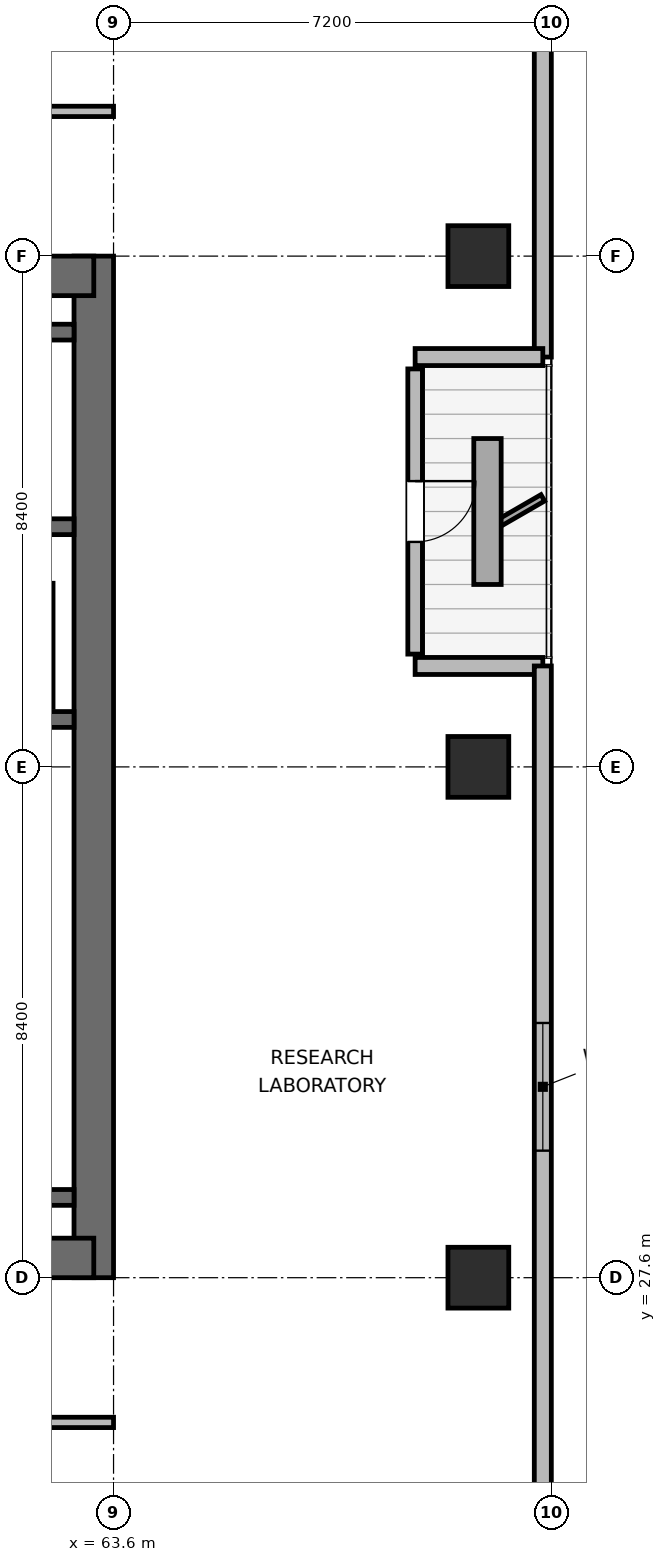
"""IFC4 building model, lengths in metres.
Left out: names, types, materials, properties, quantities, classifications, styles, units other than length and angle.
Written with IfcOpenShell. Run it as: python <this file> out.ifc"""

import sys

from ifc_helpers import new_model, si_unit, direction, frame, frame_2d, origin, origin_2d, place, context, subcontext, project, spatial, rectangle, extrude, element, fill, save


model = new_model("IFC4")
c1 = context("Model", 3, precision=1e-05, world=origin(), true_north=direction((0.0, 1.0)))
c2 = subcontext(c1, "Body", "Model", "MODEL_VIEW")
j1 = project(units=[si_unit("LENGTHUNIT", "METRE"), si_unit("PLANEANGLEUNIT", "RADIAN")], contexts=[c1])
p1 = place(None, origin())
s1 = spatial("IfcSite", under=j1, at=p1, CompositionType="ELEMENT")
p2 = place(p1, origin())
s2 = spatial("IfcBuilding", under=s1, at=p2, CompositionType="ELEMENT")
p3 = place(p2, frame((0.0, 0.0, 247.2)))
s3 = spatial("IfcBuildingStorey", under=s2, at=p3, CompositionType="ELEMENT", Elevation=247.2)
p4 = place(p3, frame((63.275, 27.6, 0.0), z_axis=(0.0, 0.0, 1.0), x_axis=(0.0, 1.0, 0.0)))
e1 = element("IfcWall", 1, at=p4, inside=s3, PredefinedType="SHEAR", context=c2, shape_type="SweptSolid", body=[
    extrude(rectangle(XDim=16.8, YDim=0.65, at=frame_2d((8.4, 0.0))), origin(), (0.0, 0.0, 1.0), 3.9),
])
p5 = place(p3, frame((53.925, 27.925, 0.0), z_axis=(0.0, 0.0, 1.0), x_axis=(1.0, 0.0, 0.0)))
e2 = element("IfcWall", 2, at=p5, inside=s3, PredefinedType="SHEAR", context=c2, shape_type="SweptSolid", body=[
    extrude(rectangle(XDim=9.35, YDim=0.65, at=frame_2d((4.675, 0.0))), origin(), (0.0, 0.0, 1.0), 3.9),
])
p6 = place(p5, frame((3.975, 0.0, 0.0)))
e3 = element("IfcOpeningElement", 3, at=p6, cuts=e2, PredefinedType="OPENING", context=c2, shape_type="SweptSolid", body=[
    extrude(rectangle(XDim=1.05, YDim=2.04, at=frame_2d((0.525, 1.02))), frame((0.0, 0.335, 0.0), z_axis=(0.0, -1.0, 0.0), x_axis=(1.0, 0.0, 0.0)), (0.0, 0.0, 1.0), 0.67),
])
p7 = place(p3, frame((53.925, 44.075, 0.0), z_axis=(0.0, 0.0, 1.0), x_axis=(1.0, 0.0, 0.0)))
e4 = element("IfcWall", 4, at=p7, inside=s3, PredefinedType="SHEAR", context=c2, shape_type="SweptSolid", body=[
    extrude(rectangle(XDim=9.35, YDim=0.65, at=frame_2d((4.675, 0.0))), origin(), (0.0, 0.0, 1.0), 3.9),
])
for number, where, z_axis, x_axis in (
    (5, (58.89, 28.92, 0.0), (0.0, 0.0, 1.0), (1.0, 0.0, 0.0)),
    (6, (58.89, 36.78, 0.0), (0.0, 0.0, 1.0), (1.0, 0.0, 0.0)),
):
    element("IfcWall", number, at=place(p3, frame(where, z_axis=z_axis, x_axis=x_axis)), inside=s3, PredefinedType="SHEAR", context=c2, shape_type="SweptSolid", body=[
        extrude(rectangle(XDim=4.06, YDim=0.26, at=frame_2d((2.03, 0.0))), origin(), (0.0, 0.0, 1.0), 3.9),
    ])
p8 = place(p3, frame((54.25, 39.95, 0.0), z_axis=(0.0, 0.0, 1.0), x_axis=(1.0, 0.0, 0.0)))
e7 = element("IfcWall", 7, at=p8, inside=s3, PredefinedType="SHEAR", context=c2, shape_type="SweptSolid", body=[
    extrude(rectangle(XDim=8.7, YDim=0.26, at=frame_2d((4.35, 0.0))), origin(), (0.0, 0.0, 1.0), 3.9),
])
p9 = place(p8, frame((0.95, 0.0, 0.0)))
e8 = element("IfcOpeningElement", 8, at=p9, cuts=e7, PredefinedType="OPENING", context=c2, shape_type="SweptSolid", body=[
    extrude(rectangle(XDim=1.0, YDim=2.04, at=frame_2d((0.5, 1.02))), frame((0.0, 0.14, 0.0), z_axis=(0.0, -1.0, 0.0), x_axis=(1.0, 0.0, 0.0)), (0.0, 0.0, 1.0), 0.28),
])
p10 = place(p3, frame((54.25, 43.15, 0.0), z_axis=(0.0, 0.0, 1.0), x_axis=(1.0, 0.0, 0.0)))
e9 = element("IfcWall", 9, at=p10, inside=s3, PredefinedType="SHEAR", context=c2, shape_type="SweptSolid", body=[
    extrude(rectangle(XDim=8.7, YDim=0.26, at=frame_2d((4.35, 0.0))), origin(), (0.0, 0.0, 1.0), 3.9),
])
for number, where, z_axis, x_axis in (
    (10, (69.6, 27.6, 0.0), (0.0, 0.0, 1.0), (1.0, 0.0, 0.0)),
    (11, (69.6, 36.0, 0.0), (0.0, 0.0, 1.0), (1.0, 0.0, 0.0)),
    (12, (69.6, 44.4, 0.0), (0.0, 0.0, 1.0), (1.0, 0.0, 0.0)),
):
    element("IfcColumn", number, at=place(p3, frame(where, z_axis=z_axis, x_axis=x_axis)), inside=s3, PredefinedType="COLUMN", context=c2, shape_type="SweptSolid", body=[
        extrude(rectangle(XDim=1.0, YDim=1.0, at=origin_2d()), origin(), (0.0, 0.0, 1.0), 3.9),
    ])
p11 = place(p3, frame((70.66, 57.182, 0.0), z_axis=(0.0, 0.0, 1.0), x_axis=(0.0, -1.0, 0.0)))
e13 = element("IfcWall", 13, at=p11, inside=s3, PredefinedType="SOLIDWALL", context=c2, shape_type="SweptSolid", body=[
    extrude(rectangle(XDim=14.442, YDim=0.28, at=frame_2d((7.221, 0.0))), origin(), (0.0, 0.0, 1.0), 3.68),
])
p12 = place(p3, frame((70.66, 42.74, 0.0), z_axis=(0.0, 0.0, 1.0), x_axis=(-1.0, 0.0, 0.0)))
e14 = element("IfcWall", 14, at=p12, inside=s3, PredefinedType="SOLIDWALL", context=c2, shape_type="SweptSolid", body=[
    extrude(rectangle(XDim=2.1, YDim=0.28, at=frame_2d((1.05, 0.0))), origin(), (0.0, 0.0, 1.0), 3.116),
])
p13 = place(p3, frame((68.56, 42.545, 0.0), z_axis=(0.0, 0.0, 1.0), x_axis=(0.0, -1.0, 0.0)))
e15 = element("IfcWall", 15, at=p13, inside=s3, PredefinedType="SOLIDWALL", context=c2, shape_type="SweptSolid", body=[
    extrude(rectangle(XDim=4.69, YDim=0.24, at=frame_2d((2.345, 0.0))), origin(), (0.0, 0.0, 1.0), 3.248),
])
p14 = place(p13, frame((1.845, 0.0, 0.0)))
e16 = element("IfcOpeningElement", 16, at=p14, cuts=e15, PredefinedType="OPENING", context=c2, shape_type="SweptSolid", body=[
    extrude(rectangle(XDim=1.0, YDim=2.02, at=frame_2d((0.5, 1.01))), frame((0.0, 0.13, 0.0), z_axis=(0.0, -1.0, 0.0), x_axis=(1.0, 0.0, 0.0)), (0.0, 0.0, 1.0), 0.26),
])
p15 = place(p3, frame((68.56, 37.66, 0.0), z_axis=(0.0, 0.0, 1.0), x_axis=(1.0, 0.0, 0.0)))
e17 = element("IfcWall", 17, at=p15, inside=s3, PredefinedType="SOLIDWALL", context=c2, shape_type="SweptSolid", body=[
    extrude(rectangle(XDim=2.1, YDim=0.28, at=frame_2d((1.05, 0.0))), origin(), (0.0, 0.0, 1.0), 3.116),
])
p16 = place(p3, frame((70.66, 37.66, 0.0), z_axis=(0.0, 0.0, 1.0), x_axis=(0.0, -1.0, 0.0)))
e18 = element("IfcWall", 18, at=p16, inside=s3, PredefinedType="SOLIDWALL", context=c2, shape_type="SweptSolid", body=[
    extrude(rectangle(XDim=13.842, YDim=0.28, at=frame_2d((6.921, 0.0))), origin(), (0.0, 0.0, 1.0), 3.68),
])
p17 = place(p16, frame((5.871, 0.0, 0.85)))
e19 = element("IfcOpeningElement", 19, at=p17, cuts=e18, PredefinedType="OPENING", context=c2, shape_type="SweptSolid", body=[
    extrude(rectangle(XDim=2.1, YDim=1.05, at=frame_2d((1.05, 0.525))), frame((0.0, 0.15, 0.0), z_axis=(0.0, -1.0, 0.0), x_axis=(1.0, 0.0, 0.0)), (0.0, 0.0, 1.0), 0.3),
])
p18 = place(p3, frame((62.5, 36.98, 0.0), z_axis=(0.0, 0.0, 1.0), x_axis=(0.0, 1.0, 0.0)))
e20 = element("IfcWall", 20, at=p18, inside=s3, PredefinedType="PARTITIONING", context=c2, shape_type="SweptSolid", body=[
    extrude(rectangle(XDim=2.04, YDim=0.21, at=frame_2d((1.02, 0.0))), origin(), (0.0, 0.0, 1.0), 3.68),
])
p19 = place(p3, frame((30.075, 25.22, 0.0), z_axis=(0.0, 0.0, 1.0), x_axis=(1.0, 0.0, 0.0)))
e21 = element("IfcWall", 21, at=p19, inside=s3, PredefinedType="PARTITIONING", context=c2, shape_type="SweptSolid", body=[
    extrude(rectangle(XDim=33.525, YDim=0.17, at=frame_2d((16.763, 0.0))), origin(), (0.0, 0.0, 1.0), 3.68),
])
p20 = place(p19, frame((2.717, 0.0, 0.0)))
e22 = element("IfcOpeningElement", 22, at=p20, cuts=e21, PredefinedType="OPENING", context=c2, shape_type="SweptSolid", body=[
    extrude(rectangle(XDim=0.95, YDim=2.04, at=frame_2d((0.475, 1.02))), frame((0.0, 0.095, 0.0), z_axis=(0.0, -1.0, 0.0), x_axis=(1.0, 0.0, 0.0)), (0.0, 0.0, 1.0), 0.19),
])
p21 = place(p19, frame((8.505, 0.0, 0.0)))
e23 = element("IfcOpeningElement", 23, at=p21, cuts=e21, PredefinedType="OPENING", context=c2, shape_type="SweptSolid", body=[
    extrude(rectangle(XDim=0.95, YDim=2.04, at=frame_2d((0.475, 1.02))), frame((0.0, 0.095, 0.0), z_axis=(0.0, -1.0, 0.0), x_axis=(1.0, 0.0, 0.0)), (0.0, 0.0, 1.0), 0.19),
])
p22 = place(p19, frame((13.695, 0.0, 0.0)))
e24 = element("IfcOpeningElement", 24, at=p22, cuts=e21, PredefinedType="OPENING", context=c2, shape_type="SweptSolid", body=[
    extrude(rectangle(XDim=0.95, YDim=2.04, at=frame_2d((0.475, 1.02))), frame((0.0, 0.095, 0.0), z_axis=(0.0, -1.0, 0.0), x_axis=(1.0, 0.0, 0.0)), (0.0, 0.0, 1.0), 0.19),
])
p23 = place(p19, frame((18.88, 0.0, 0.0)))
e25 = element("IfcOpeningElement", 25, at=p23, cuts=e21, PredefinedType="OPENING", context=c2, shape_type="SweptSolid", body=[
    extrude(rectangle(XDim=0.95, YDim=2.04, at=frame_2d((0.475, 1.02))), frame((0.0, 0.095, 0.0), z_axis=(0.0, -1.0, 0.0), x_axis=(1.0, 0.0, 0.0)), (0.0, 0.0, 1.0), 0.19),
])
p24 = place(p19, frame((24.065, 0.0, 0.0)))
e26 = element("IfcOpeningElement", 26, at=p24, cuts=e21, PredefinedType="OPENING", context=c2, shape_type="SweptSolid", body=[
    extrude(rectangle(XDim=0.95, YDim=2.04, at=frame_2d((0.475, 1.02))), frame((0.0, 0.095, 0.0), z_axis=(0.0, -1.0, 0.0), x_axis=(1.0, 0.0, 0.0)), (0.0, 0.0, 1.0), 0.19),
])
p25 = place(p19, frame((29.855, 0.0, 0.0)))
e27 = element("IfcOpeningElement", 27, at=p25, cuts=e21, PredefinedType="OPENING", context=c2, shape_type="SweptSolid", body=[
    extrude(rectangle(XDim=0.95, YDim=2.04, at=frame_2d((0.475, 1.02))), frame((0.0, 0.095, 0.0), z_axis=(0.0, -1.0, 0.0), x_axis=(1.0, 0.0, 0.0)), (0.0, 0.0, 1.0), 0.19),
])
p26 = place(p3, frame((30.075, 46.78, 0.0), z_axis=(0.0, 0.0, 1.0), x_axis=(1.0, 0.0, 0.0)))
e28 = element("IfcWall", 28, at=p26, inside=s3, PredefinedType="PARTITIONING", context=c2, shape_type="SweptSolid", body=[
    extrude(rectangle(XDim=33.525, YDim=0.17, at=frame_2d((16.763, 0.0))), origin(), (0.0, 0.0, 1.0), 3.68),
])
p27 = place(p26, frame((4.693, 0.0, 0.0)))
e29 = element("IfcOpeningElement", 29, at=p27, cuts=e28, PredefinedType="OPENING", context=c2, shape_type="SweptSolid", body=[
    extrude(rectangle(XDim=0.95, YDim=2.04, at=frame_2d((0.475, 1.02))), frame((0.0, 0.095, 0.0), z_axis=(0.0, -1.0, 0.0), x_axis=(1.0, 0.0, 0.0)), (0.0, 0.0, 1.0), 0.19),
])
p28 = place(p26, frame((11.725, 0.0, 0.0)))
e30 = element("IfcOpeningElement", 30, at=p28, cuts=e28, PredefinedType="OPENING", context=c2, shape_type="SweptSolid", body=[
    extrude(rectangle(XDim=0.95, YDim=2.04, at=frame_2d((0.475, 1.02))), frame((0.0, 0.095, 0.0), z_axis=(0.0, -1.0, 0.0), x_axis=(1.0, 0.0, 0.0)), (0.0, 0.0, 1.0), 0.19),
])
p29 = place(p26, frame((19.505, 0.0, 0.0)))
e31 = element("IfcOpeningElement", 31, at=p29, cuts=e28, PredefinedType="OPENING", context=c2, shape_type="SweptSolid", body=[
    extrude(rectangle(XDim=0.95, YDim=2.04, at=frame_2d((0.475, 1.02))), frame((0.0, 0.095, 0.0), z_axis=(0.0, -1.0, 0.0), x_axis=(1.0, 0.0, 0.0)), (0.0, 0.0, 1.0), 0.19),
])
p30 = place(p26, frame((29.235, 0.0, 0.0)))
e32 = element("IfcOpeningElement", 32, at=p30, cuts=e28, PredefinedType="OPENING", context=c2, shape_type="SweptSolid", body=[
    extrude(rectangle(XDim=0.95, YDim=2.04, at=frame_2d((0.475, 1.02))), frame((0.0, 0.095, 0.0), z_axis=(0.0, -1.0, 0.0), x_axis=(1.0, 0.0, 0.0)), (0.0, 0.0, 1.0), 0.19),
])
p31 = place(p14, origin())
e33 = element("IfcDoor", 33, at=p31, inside=s3, OperationType="SINGLE_SWING_LEFT", PredefinedType="DOOR", context=c2, shape_type="SweptSolid", body=[
    extrude(rectangle(XDim=1.0, YDim=2.02, at=frame_2d((0.5, 1.01))), frame((0.0, 0.025, 0.0), z_axis=(0.0, -1.0, 0.0), x_axis=(1.0, 0.0, 0.0)), (0.0, 0.0, 1.0), 0.05),
])
fill(e16, e33)
p32 = place(p17, origin())
e34 = element("IfcWindow", 34, at=p32, inside=s3, PartitioningType="SINGLE_PANEL", PredefinedType="WINDOW", context=c2, shape_type="SweptSolid", body=[
    extrude(rectangle(XDim=2.1, YDim=1.05, at=frame_2d((1.05, 0.525))), frame((0.0, 0.03, 0.0), z_axis=(0.0, -1.0, 0.0), x_axis=(1.0, 0.0, 0.0)), (0.0, 0.0, 1.0), 0.06),
])
fill(e19, e34)
save(model, sys.argv[1])
